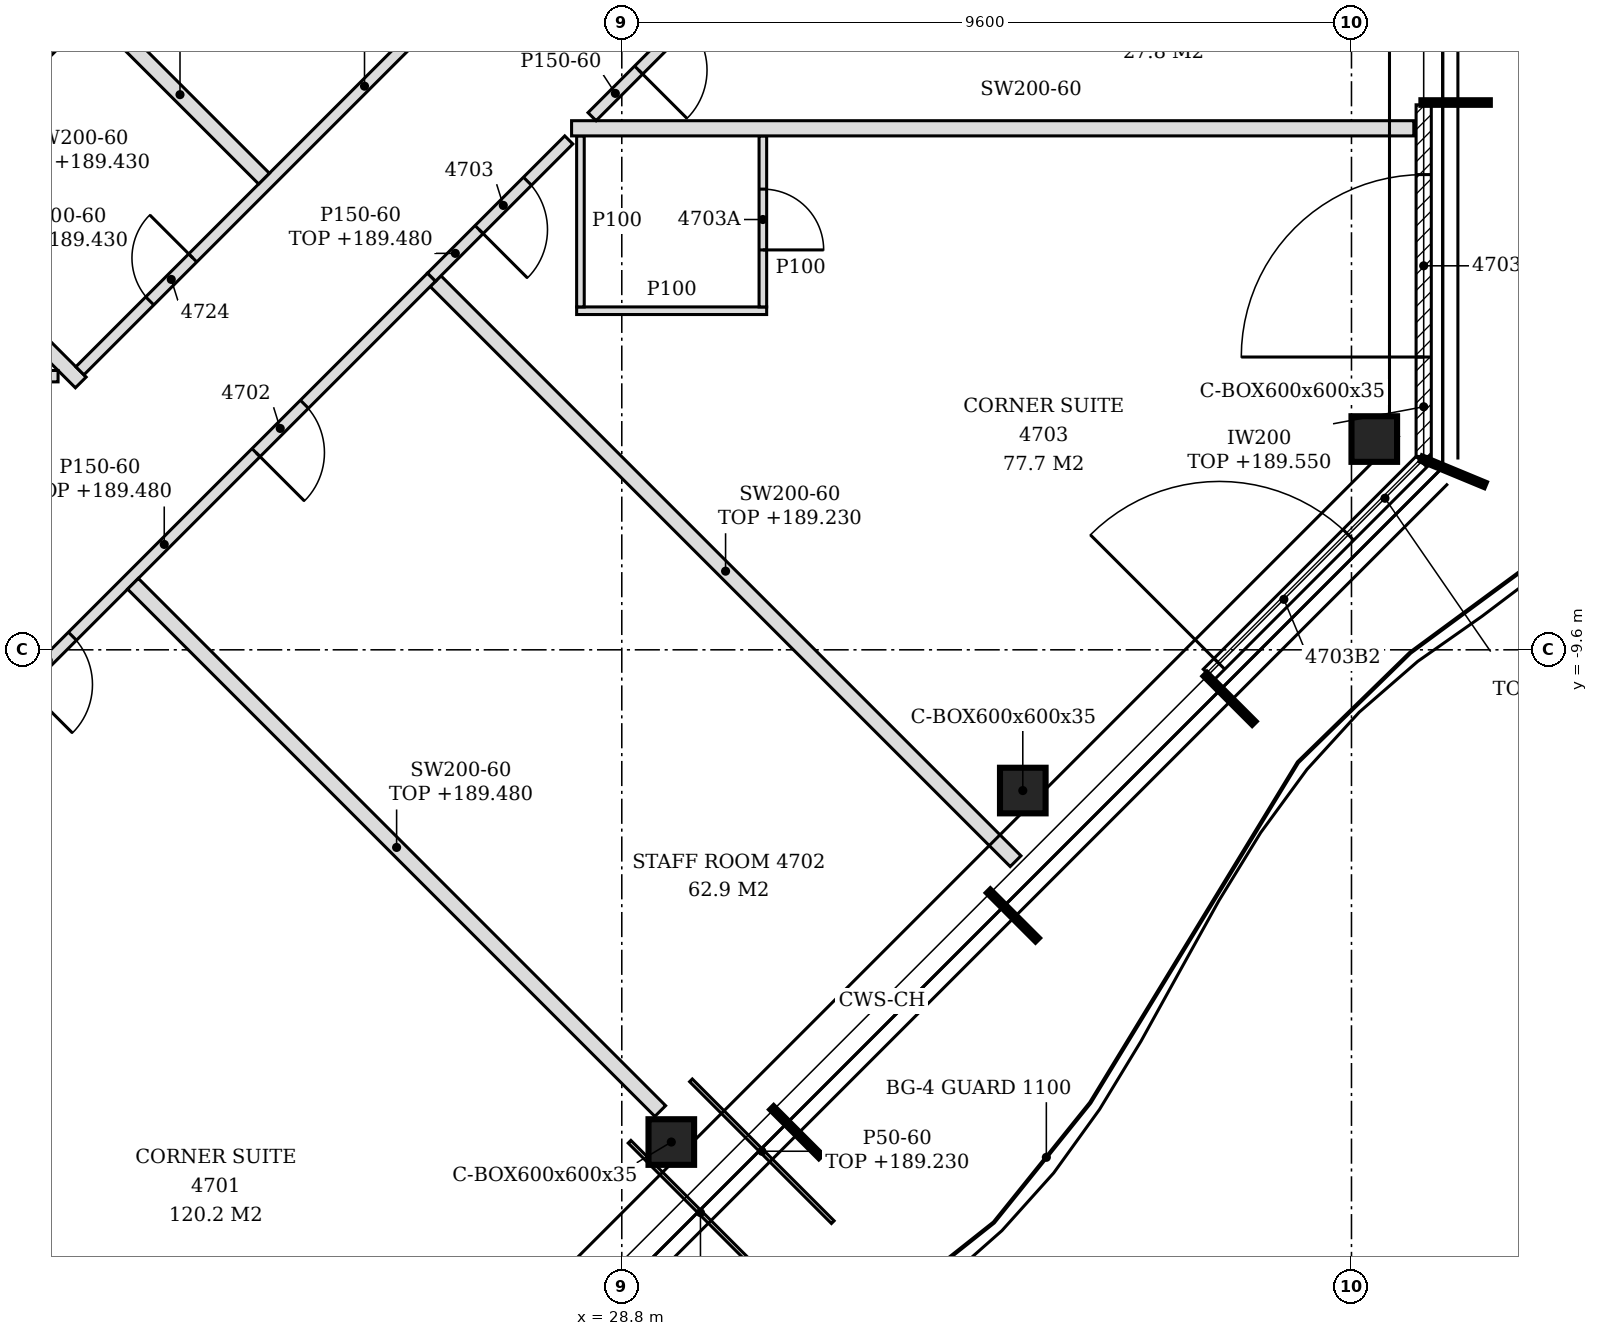
"""IFC4 building model, lengths in metres.
Left out: names, types, materials, properties, quantities, classifications, styles, units other than length and angle.
Written with IfcOpenShell. Run it as: python <this file> out.ifc"""

import sys

from ifc_helpers import new_model, si_unit, direction, frame, frame_2d, origin, origin_2d, place, context, subcontext, project, spatial, polyline, rectangle, hollow_rectangle, outline, extrude, clip, halfspace, element, fill, save


model = new_model("IFC4")
c1 = context("Model", 3, precision=1e-05, world=origin(), true_north=direction((0.0, 1.0)))
c2 = subcontext(c1, "Body", "Model", "MODEL_VIEW")
j1 = project(units=[si_unit("LENGTHUNIT", "METRE"), si_unit("PLANEANGLEUNIT", "RADIAN")], contexts=[c1])
p1 = place(None, origin())
s1 = spatial("IfcSite", under=j1, at=p1, CompositionType="ELEMENT")
p2 = place(p1, origin())
s2 = spatial("IfcBuilding", under=s1, at=p2, CompositionType="ELEMENT")
p3 = place(p2, frame((0.0, 0.0, 186.6)))
s3 = spatial("IfcBuildingStorey", under=s2, at=p3, CompositionType="ELEMENT", Elevation=186.6)
p4 = place(p3, frame((29.451, -16.076, -0.15), z_axis=(0.38726387287, -0.258155907814, 0.885088820419), x_axis=(0.554670435147, 0.832070134288, 0.0)))
e1 = element("IfcColumn", 1, at=p4, inside=s3, PredefinedType="COLUMN", context=c2, shape_type="Clipping", body=[
    clip(extrude(hollow_rectangle(XDim=0.6, YDim=0.6, WallThickness=0.035, at=origin_2d()), origin(), (0.0, 0.0, 1.0), 4.067), halfspace(frame((0.0, 0.0, 4.049), z_axis=(0.0, 0.0, 1.0), x_axis=(1.0, 0.0, 0.0)), False)),
])
for number, where, z_axis, x_axis in (
    (2, (34.076, -11.451, -0.15), (0.387, -0.258, 0.885), (0.555, 0.832, 0.0)),
    (3, (38.7, -6.827, -0.15), (0.387, -0.258, 0.885), (0.555, 0.832, 0.0)),
):
    element("IfcColumn", number, at=place(p3, frame(where, z_axis=z_axis, x_axis=x_axis)), inside=s3, PredefinedType="COLUMN", context=c2, shape_type="Clipping", body=[
        clip(extrude(hollow_rectangle(XDim=0.6, YDim=0.6, WallThickness=0.035, at=origin_2d()), origin(), (0.0, 0.0, 1.0), 4.067), halfspace(frame((0.0, 0.0, 4.049), z_axis=(0.0, 0.0, 1.0), x_axis=(1.0, 0.0, 0.0)), False)),
    ])
p5 = place(p3, frame((36.521, -9.926, 0.0), z_axis=(0.0, 0.0, 1.0), x_axis=(0.707106781187, 0.707106781187, 0.0)))
e4 = element("IfcWall", 4, at=p5, inside=s3, PredefinedType="NOTDEFINED", context=c2, shape_type="SweptSolid", body=[
    extrude(rectangle(XDim=3.962, YDim=0.2, at=frame_2d((1.981, 0.0))), origin(), (0.0, 0.0, 1.0), 3.0),
])
p6 = place(p5, frame((0.2, 0.0, 0.0)))
e5 = element("IfcOpeningElement", 5, at=p6, cuts=e4, PredefinedType="OPENING", context=c2, shape_type="SweptSolid", body=[
    extrude(rectangle(XDim=2.4, YDim=2.4, at=frame_2d((1.2, 1.2))), frame((0.0, 0.11, 0.0), z_axis=(0.0, -1.0, 0.0), x_axis=(1.0, 0.0, 0.0)), (0.0, 0.0, 1.0), 0.22),
])
p7 = place(p3, frame((39.35, -7.056, 0.0), z_axis=(0.0, 0.0, 1.0), x_axis=(0.0, 1.0, 0.0)))
e6 = element("IfcWall", 6, at=p7, inside=s3, PredefinedType="NOTDEFINED", context=c2, shape_type="SweptSolid", body=[
    extrude(rectangle(XDim=4.626, YDim=0.2, at=frame_2d((2.313, 0.0))), origin(), (0.0, 0.0, 1.0), 2.95),
])
p8 = place(p7, frame((1.308, 0.0, 0.0)))
e7 = element("IfcOpeningElement", 7, at=p8, cuts=e6, PredefinedType="OPENING", context=c2, shape_type="SweptSolid", body=[
    extrude(rectangle(XDim=2.4, YDim=2.4, at=frame_2d((1.2, 1.2))), frame((0.0, 0.11, 0.0), z_axis=(0.0, -1.0, 0.0), x_axis=(1.0, 0.0, 0.0)), (0.0, 0.0, 1.0), 0.22),
])
p9 = place(p3, frame((29.306, -15.668, 0.0), z_axis=(0.0, 0.0, 1.0), x_axis=(-0.707106781187, 0.707106781187, 0.0)))
e8 = element("IfcWall", 8, at=p9, inside=s3, PredefinedType="PARTITIONING", context=c2, shape_type="SweptSolid", body=[
    extrude(rectangle(XDim=9.81, YDim=0.2, at=frame_2d((4.905, 0.0))), origin(), (0.0, 0.0, 1.0), 2.88),
])
p10 = place(p3, frame((33.981, -12.381, 0.0), z_axis=(0.0, 0.0, 1.0), x_axis=(-0.707095469378, 0.707118092814, 0.0)))
e9 = element("IfcWall", 9, at=p10, inside=s3, PredefinedType="PARTITIONING", context=c2, shape_type="SweptSolid", body=[
    extrude(rectangle(XDim=10.792, YDim=0.2, at=frame_2d((5.396, 0.0))), origin(), (0.0, 0.0, 1.0), 2.63),
])
p11 = place(p3, frame((20.322, -10.672, 0.0), z_axis=(0.0, 0.0, 1.0), x_axis=(0.707106781187, 0.707106781187, 0.0)))
e10 = element("IfcWall", 10, at=p11, inside=s3, PredefinedType="PARTITIONING", context=c2, shape_type="SweptSolid", body=[
    extrude(rectangle(XDim=8.45, YDim=0.15, at=frame_2d((4.225, 0.0))), origin(), (0.0, 0.0, 1.0), 2.88),
])
p12 = place(p11, frame((0.869, 0.0, 0.0)))
e11 = element("IfcOpeningElement", 11, at=p12, cuts=e10, PredefinedType="OPENING", context=c2, shape_type="SweptSolid", body=[
    extrude(rectangle(XDim=0.9, YDim=2.1, at=frame_2d((0.45, 1.05))), frame((0.0, 0.085, 0.0), z_axis=(0.0, -1.0, 0.0), x_axis=(1.0, 0.0, 0.0)), (0.0, 0.0, 1.0), 0.17),
])
p13 = place(p11, frame((5.185, 0.0, 0.0)))
e12 = element("IfcOpeningElement", 12, at=p13, cuts=e10, PredefinedType="OPENING", context=c2, shape_type="SweptSolid", body=[
    extrude(rectangle(XDim=0.9, YDim=2.1, at=frame_2d((0.45, 1.05))), frame((0.0, 0.085, 0.0), z_axis=(0.0, -1.0, 0.0), x_axis=(1.0, 0.0, 0.0)), (0.0, 0.0, 1.0), 0.17),
])
p14 = place(p3, frame((21.682, -6.082, 0.0), z_axis=(0.0, 0.0, 1.0), x_axis=(-0.707143579957, 0.707069980501, 0.0)))
e13 = element("IfcWall", 13, at=p14, inside=s3, PredefinedType="PARTITIONING", context=c2, shape_type="SweptSolid", body=[
    extrude(rectangle(XDim=3.317, YDim=0.2, at=frame_2d((1.659, 0.0))), origin(), (0.0, 0.0, 1.0), 2.83),
])
p15 = place(p3, frame((19.125, -6.0, 0.0), z_axis=(0.0, 0.0, 1.0), x_axis=(1.0, 0.0, 0.0)))
e14 = element("IfcWall", 14, at=p15, inside=s3, PredefinedType="PARTITIONING", context=c2, shape_type="SweptSolid", body=[
    extrude(outline(polyline([(0.0, 0.0), (2.259, 0.0), (2.259, 3.45), (0.225, 3.45), (0.223, 2.83), (0.0, 2.83), (0.0, 0.0)])), frame((0.0, 0.075, 0.0), z_axis=(0.0, -1.0, 0.0), x_axis=(1.0, 0.0, 0.0)), (0.0, 0.0, 1.0), 0.15),
])
p16 = place(p3, frame((21.671, -5.929, 0.0), z_axis=(0.0, 0.0, 1.0), x_axis=(0.707121156928, 0.707092405153, 0.0)))
e15 = element("IfcWall", 15, at=p16, inside=s3, PredefinedType="PARTITIONING", context=c2, shape_type="SweptSolid", body=[
    extrude(rectangle(XDim=8.491, YDim=0.15, at=frame_2d((4.246, 0.0))), origin(), (0.0, 0.0, 1.0), 2.88),
])
p17 = place(p16, frame((1.3, 0.0, 0.0)))
e16 = element("IfcOpeningElement", 16, at=p17, cuts=e15, PredefinedType="OPENING", context=c2, shape_type="SweptSolid", body=[
    extrude(rectangle(XDim=0.8, YDim=2.1, at=frame_2d((0.4, 1.05))), frame((0.0, 0.085, 0.0), z_axis=(0.0, -1.0, 0.0), x_axis=(1.0, 0.0, 0.0)), (0.0, 0.0, 1.0), 0.17),
])
p18 = place(p3, frame((28.206, -5.139, 0.0), z_axis=(0.0, 0.0, 1.0), x_axis=(1.0, 0.0, 0.0)))
e17 = element("IfcWall", 17, at=p18, inside=s3, PredefinedType="PARTITIONING", context=c2, shape_type="SweptSolid", body=[
    extrude(rectangle(XDim=2.5, YDim=0.1, at=frame_2d((1.25, 0.0))), origin(), (0.0, 0.0, 1.0), 3.45),
])
p19 = place(p3, frame((28.256, -5.089, 0.0), z_axis=(0.0, 0.0, 1.0), x_axis=(0.0, 1.0, 0.0)))
e18 = element("IfcWall", 18, at=p19, inside=s3, PredefinedType="PARTITIONING", context=c2, shape_type="SweptSolid", body=[
    extrude(outline(polyline([(0.0, 0.0), (2.25, 0.0), (2.25, 3.45), (1.744, 3.45), (1.742, 2.88), (1.534, 2.88), (1.532, 3.45), (0.0, 3.45), (0.0, 0.0)])), frame((0.0, 0.05, 0.0), z_axis=(0.0, -1.0, 0.0), x_axis=(1.0, 0.0, 0.0)), (0.0, 0.0, 1.0), 0.1),
])
p20 = place(p3, frame((30.656, -5.089, 0.0), z_axis=(0.0, 0.0, 1.0), x_axis=(0.0, 1.0, 0.0)))
e19 = element("IfcWall", 19, at=p20, inside=s3, PredefinedType="PARTITIONING", context=c2, shape_type="SweptSolid", body=[
    extrude(outline(polyline([(0.0, 0.0), (2.25, 0.0), (2.25, 3.45), (1.744, 3.45), (1.742, 2.88), (1.534, 2.88), (1.532, 3.45), (0.0, 3.45), (0.0, 0.0)])), frame((0.0, 0.05, 0.0), z_axis=(0.0, -1.0, 0.0), x_axis=(1.0, 0.0, 0.0)), (0.0, 0.0, 1.0), 0.1),
])
p21 = place(p20, frame((0.75, 0.0, 0.0)))
e20 = element("IfcOpeningElement", 20, at=p21, cuts=e19, PredefinedType="OPENING", context=c2, shape_type="SweptSolid", body=[
    extrude(rectangle(XDim=0.8, YDim=2.1, at=frame_2d((0.4, 1.05))), frame((0.0, 0.06, 0.0), z_axis=(0.0, -1.0, 0.0), x_axis=(1.0, 0.0, 0.0)), (0.0, 0.0, 1.0), 0.12),
])
p22 = place(p3, frame((26.297, -4.697, 0.0), z_axis=(0.0, 0.0, 1.0), x_axis=(0.707250205701, 0.706963327575, 0.0)))
e21 = element("IfcWall", 21, at=p22, inside=s3, PredefinedType="PARTITIONING", context=c2, shape_type="SweptSolid", body=[
    extrude(rectangle(XDim=2.553, YDim=0.15, at=frame_2d((1.276, 0.0))), origin(), (0.0, 0.0, 1.0), 2.88),
])
p23 = place(p22, frame((0.885, 0.0, 0.0)))
e22 = element("IfcOpeningElement", 22, at=p23, cuts=e21, PredefinedType="OPENING", context=c2, shape_type="SweptSolid", body=[
    extrude(rectangle(XDim=0.9, YDim=2.1, at=frame_2d((0.45, 1.05))), frame((0.0, 0.085, 0.0), z_axis=(0.0, -1.0, 0.0), x_axis=(1.0, 0.0, 0.0)), (0.0, 0.0, 1.0), 0.17),
])
p24 = place(p3, frame((19.195, -3.737, 0.0), z_axis=(0.0, 0.0, 1.0), x_axis=(0.707235264291, 0.706978274732, 0.0)))
e23 = element("IfcWall", 23, at=p24, inside=s3, PredefinedType="PARTITIONING", context=c2, shape_type="SweptSolid", body=[
    extrude(rectangle(XDim=3.8, YDim=0.2, at=frame_2d((1.9, 0.0))), origin(), (0.0, 0.0, 1.0), 2.83),
])
p25 = place(p3, frame((24.093, -3.401, 0.0), z_axis=(0.0, 0.0, 1.0), x_axis=(-0.707263013346, 0.7069505145, 0.0)))
e24 = element("IfcWall", 24, at=p25, inside=s3, PredefinedType="PARTITIONING", context=c2, shape_type="SweptSolid", body=[
    extrude(rectangle(XDim=3.125, YDim=0.2, at=frame_2d((1.562, 0.0))), origin(), (0.0, 0.0, 1.0), 2.88),
])
p26 = place(p3, frame((28.139, -2.739, 0.0), z_axis=(0.0, 0.0, 1.0), x_axis=(1.0, 0.0, 0.0)))
e25 = element("IfcWall", 25, at=p26, inside=s3, PredefinedType="PARTITIONING", context=c2, shape_type="SweptSolid", body=[
    extrude(outline(polyline([(0.0, 0.0), (11.081, 0.0), (11.081, 3.45), (3.21, 3.45), (3.208, 2.63), (2.91, 2.63), (2.908, 3.45), (0.0, 3.45), (0.0, 0.0)])), frame((0.0, 0.1, 0.0), z_axis=(0.0, -1.0, 0.0), x_axis=(1.0, 0.0, 0.0)), (0.0, 0.0, 1.0), 0.2),
])
p27 = place(p3, frame((28.409, -2.586, 0.0), z_axis=(0.0, 0.0, 1.0), x_axis=(0.706899570422, 0.707313931248, 0.0)))
e26 = element("IfcWall", 26, at=p27, inside=s3, PredefinedType="PARTITIONING", context=c2, shape_type="SweptSolid", body=[
    extrude(rectangle(XDim=2.357, YDim=0.15, at=frame_2d((1.178, 0.0))), origin(), (0.0, 0.0, 1.0), 3.45),
])
p28 = place(p27, frame((0.867, 0.0, 0.0)))
e27 = element("IfcOpeningElement", 27, at=p28, cuts=e26, PredefinedType="OPENING", context=c2, shape_type="SweptSolid", body=[
    extrude(rectangle(XDim=0.9, YDim=2.1, at=frame_2d((0.45, 1.05))), frame((0.0, 0.085, 0.0), z_axis=(0.0, -1.0, 0.0), x_axis=(1.0, 0.0, 0.0)), (0.0, 0.0, 1.0), 0.17),
])
p29 = place(p3, frame((30.768, -17.938, 0.0), z_axis=(0.0, 0.0, 1.0), x_axis=(-0.707106781187, 0.707106781187, 0.0)))
e28 = element("IfcWall", 28, at=p29, inside=s3, PredefinedType="PARTITIONING", context=c2, shape_type="SweptSolid", body=[
    extrude(rectangle(XDim=2.638, YDim=0.05, at=frame_2d((1.319, 0.0))), origin(), (0.0, 0.0, 1.0), 2.93),
])
p30 = place(p3, frame((31.576, -17.13, 0.0), z_axis=(0.0, 0.0, 1.0), x_axis=(-0.707060512135, 0.707153047211, 0.0)))
e29 = element("IfcWall", 29, at=p30, inside=s3, PredefinedType="PARTITIONING", context=c2, shape_type="SweptSolid", body=[
    extrude(rectangle(XDim=2.638, YDim=0.05, at=frame_2d((1.319, 0.0))), origin(), (0.0, 0.0, 1.0), 2.63),
])
p31 = place(p6, origin())
e30 = element("IfcDoor", 30, at=p31, inside=s3, OperationType="SINGLE_SWING_LEFT", PredefinedType="DOOR", context=c2, shape_type="SweptSolid", body=[
    extrude(rectangle(XDim=2.4, YDim=2.4, at=frame_2d((1.2, 1.2))), frame((0.0, 0.025, 0.0), z_axis=(0.0, -1.0, 0.0), x_axis=(1.0, 0.0, 0.0)), (0.0, 0.0, 1.0), 0.05),
])
fill(e5, e30)
p32 = place(p8, origin())
e31 = element("IfcDoor", 31, at=p32, inside=s3, OperationType="SINGLE_SWING_LEFT", PredefinedType="DOOR", context=c2, shape_type="SweptSolid", body=[
    extrude(rectangle(XDim=2.4, YDim=2.4, at=frame_2d((1.2, 1.2))), frame((0.0, 0.025, 0.0), z_axis=(0.0, -1.0, 0.0), x_axis=(1.0, 0.0, 0.0)), (0.0, 0.0, 1.0), 0.05),
])
fill(e7, e31)
p33 = place(p12, frame((0.9, 0.0, 0.0), z_axis=(0.0, 0.0, 1.0), x_axis=(-1.0, 0.0, 0.0)))
e32 = element("IfcDoor", 32, at=p33, inside=s3, OperationType="SINGLE_SWING_RIGHT", PredefinedType="DOOR", context=c2, shape_type="SweptSolid", body=[
    extrude(rectangle(XDim=0.9, YDim=2.1, at=frame_2d((0.45, 1.05))), frame((0.0, 0.025, 0.0), z_axis=(0.0, -1.0, 0.0), x_axis=(1.0, 0.0, 0.0)), (0.0, 0.0, 1.0), 0.05),
])
fill(e11, e32)
p34 = place(p13, frame((0.9, 0.0, 0.0), z_axis=(0.0, 0.0, 1.0), x_axis=(-1.0, 0.0, 0.0)))
e33 = element("IfcDoor", 33, at=p34, inside=s3, OperationType="SINGLE_SWING_RIGHT", PredefinedType="DOOR", context=c2, shape_type="SweptSolid", body=[
    extrude(rectangle(XDim=0.9, YDim=2.1, at=frame_2d((0.45, 1.05))), frame((0.0, 0.025, 0.0), z_axis=(0.0, -1.0, 0.0), x_axis=(1.0, 0.0, 0.0)), (0.0, 0.0, 1.0), 0.05),
])
fill(e12, e33)
p35 = place(p23, frame((0.9, 0.0, 0.0), z_axis=(0.0, 0.0, 1.0), x_axis=(-1.0, 0.0, 0.0)))
e34 = element("IfcDoor", 34, at=p35, inside=s3, OperationType="SINGLE_SWING_RIGHT", PredefinedType="DOOR", context=c2, shape_type="SweptSolid", body=[
    extrude(rectangle(XDim=0.9, YDim=2.1, at=frame_2d((0.45, 1.05))), frame((0.0, 0.025, 0.0), z_axis=(0.0, -1.0, 0.0), x_axis=(1.0, 0.0, 0.0)), (0.0, 0.0, 1.0), 0.05),
])
fill(e22, e34)
p36 = place(p21, frame((0.8, 0.0, 0.0), z_axis=(0.0, 0.0, 1.0), x_axis=(-1.0, 0.0, 0.0)))
e35 = element("IfcDoor", 35, at=p36, inside=s3, OperationType="SINGLE_SWING_RIGHT", PredefinedType="DOOR", context=c2, shape_type="SweptSolid", body=[
    extrude(rectangle(XDim=0.8, YDim=2.1, at=frame_2d((0.4, 1.05))), frame((0.0, 0.025, 0.0), z_axis=(0.0, -1.0, 0.0), x_axis=(1.0, 0.0, 0.0)), (0.0, 0.0, 1.0), 0.05),
])
fill(e20, e35)
p37 = place(p28, frame((0.9, 0.0, 0.0), z_axis=(0.0, 0.0, 1.0), x_axis=(-1.0, 0.0, 0.0)))
e36 = element("IfcDoor", 36, at=p37, inside=s3, OperationType="SINGLE_SWING_RIGHT", PredefinedType="DOOR", context=c2, shape_type="SweptSolid", body=[
    extrude(rectangle(XDim=0.9, YDim=2.1, at=frame_2d((0.45, 1.05))), frame((0.0, 0.025, 0.0), z_axis=(0.0, -1.0, 0.0), x_axis=(1.0, 0.0, 0.0)), (0.0, 0.0, 1.0), 0.05),
])
fill(e27, e36)
p38 = place(p17, origin())
e37 = element("IfcDoor", 37, at=p38, inside=s3, OperationType="SINGLE_SWING_RIGHT", PredefinedType="DOOR", context=c2, shape_type="SweptSolid", body=[
    extrude(rectangle(XDim=0.8, YDim=2.1, at=frame_2d((0.4, 1.05))), frame((0.0, 0.025, 0.0), z_axis=(0.0, -1.0, 0.0), x_axis=(1.0, 0.0, 0.0)), (0.0, 0.0, 1.0), 0.05),
])
fill(e16, e37)
save(model, sys.argv[1])
